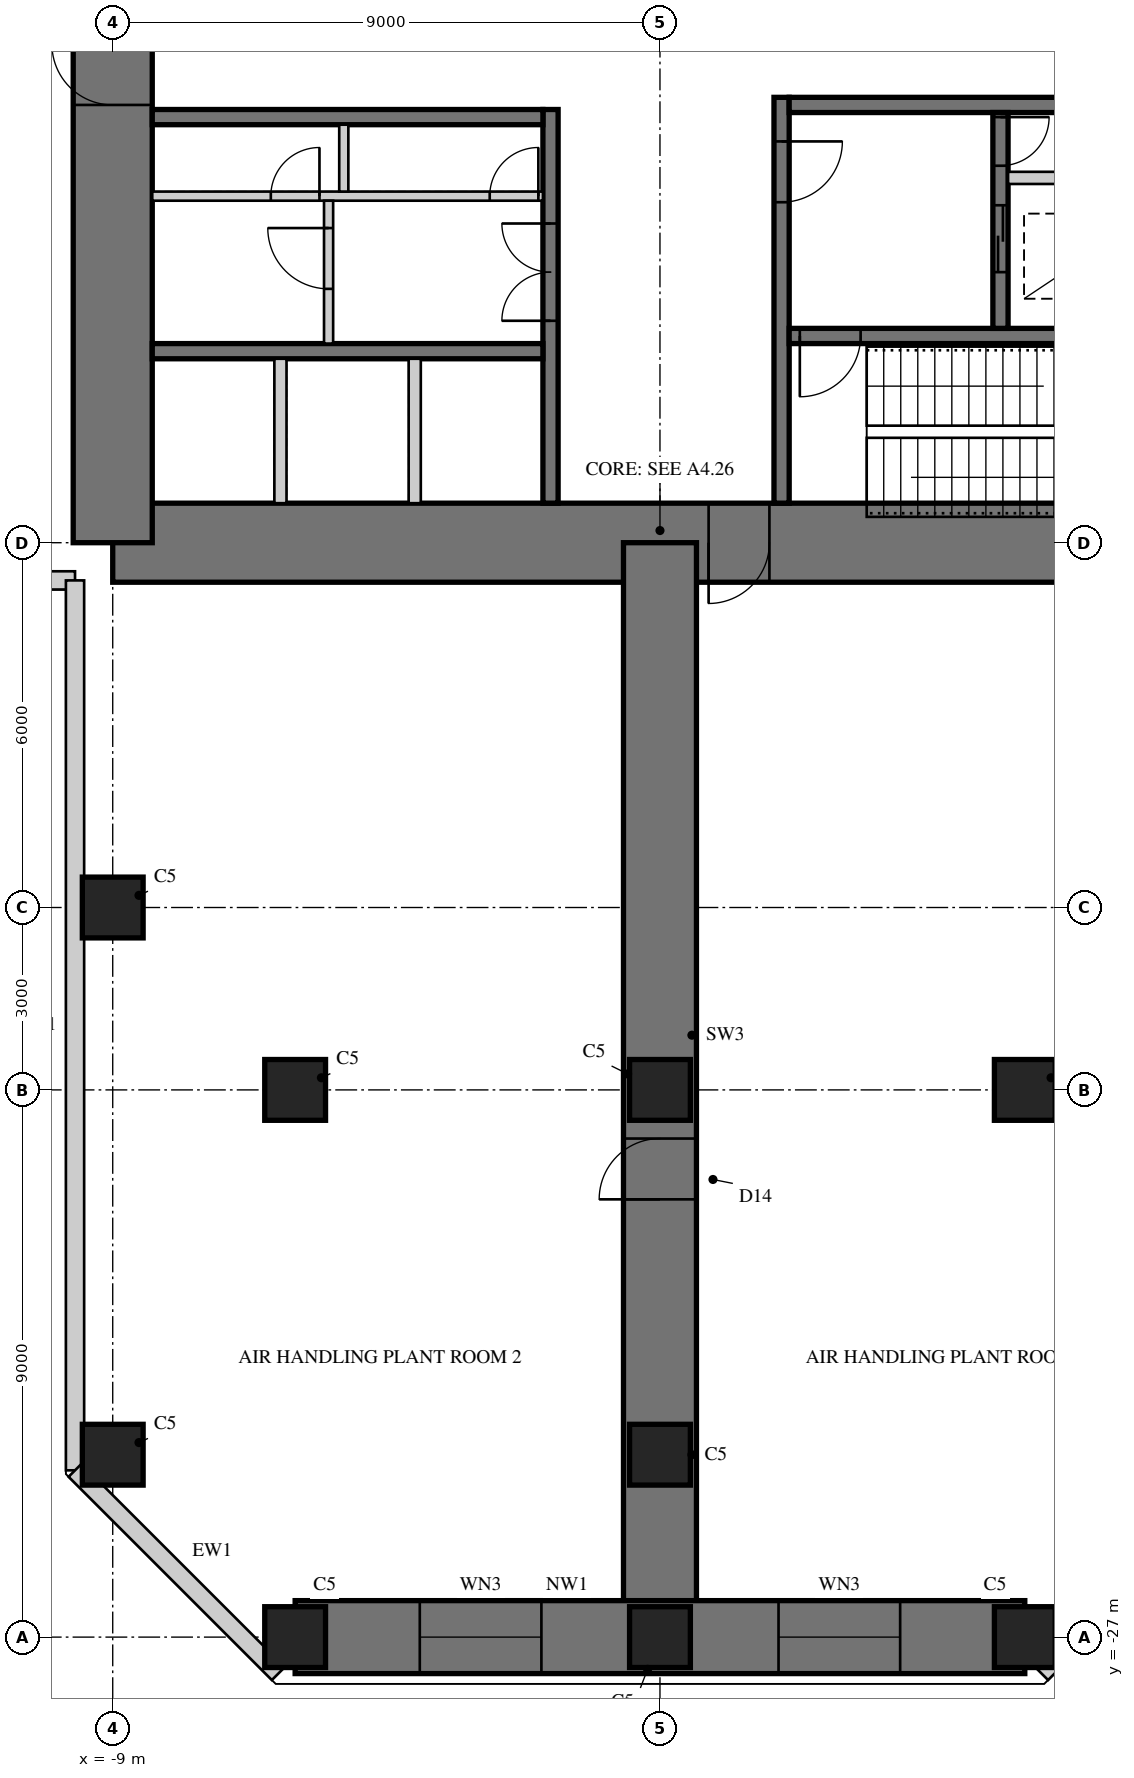
"""IFC4 building model, lengths in metres.
Left out: names, types, materials, properties, quantities, classifications, styles, units other than length and angle.
Written with IfcOpenShell. Run it as: python <this file> out.ifc"""

import sys

from ifc_helpers import new_model, si_unit, direction, frame, frame_2d, origin, origin_2d, place, context, subcontext, project, spatial, rectangle, hollow_rectangle, extrude, element, fill, save


model = new_model("IFC4")
c1 = context("Model", 3, precision=1e-05, world=origin(), true_north=direction((0.0, 1.0)))
c2 = subcontext(c1, "Body", "Model", "MODEL_VIEW")
j1 = project(units=[si_unit("LENGTHUNIT", "METRE"), si_unit("PLANEANGLEUNIT", "RADIAN")], contexts=[c1])
p1 = place(None, origin())
s1 = spatial("IfcSite", under=j1, at=p1, CompositionType="ELEMENT")
p2 = place(p1, origin())
s2 = spatial("IfcBuilding", under=s1, at=p2, CompositionType="ELEMENT")
p3 = place(p2, frame((0.0, 0.0, 164.5)))
s3 = spatial("IfcBuildingStorey", under=s2, at=p3, CompositionType="ELEMENT", Elevation=164.5)
p4 = place(p3, frame((-9.0, -9.0, 0.0), z_axis=(0.0, 0.0, 1.0), x_axis=(1.0, 0.0, 0.0)))
e1 = element("IfcWall", 1, at=p4, inside=s3, PredefinedType="SHEAR", context=c2, shape_type="SweptSolid", body=[
    extrude(rectangle(XDim=18.0, YDim=1.3, at=frame_2d((9.0, 0.0))), origin(), (0.0, 0.0, 1.0), 5.0),
])
p5 = place(p4, frame((9.8, 0.0, 0.0)))
e2 = element("IfcOpeningElement", 2, at=p5, cuts=e1, PredefinedType="OPENING", context=c2, shape_type="SweptSolid", body=[
    extrude(rectangle(XDim=1.0, YDim=2.4, at=frame_2d((0.5, 1.2))), frame((0.0, 0.66, 0.0), z_axis=(0.0, -1.0, 0.0), x_axis=(1.0, 0.0, 0.0)), (0.0, 0.0, 1.0), 1.32),
])
p6 = place(p3, frame((-9.0, 9.0, 0.0), z_axis=(0.0, 0.0, 1.0), x_axis=(0.0, -1.0, 0.0)))
e3 = element("IfcWall", 3, at=p6, inside=s3, PredefinedType="SHEAR", context=c2, shape_type="SweptSolid", body=[
    extrude(rectangle(XDim=18.0, YDim=1.3, at=frame_2d((9.0, 0.0))), origin(), (0.0, 0.0, 1.0), 5.0),
])
p7 = place(p6, frame((9.8, 0.0, 0.0)))
e4 = element("IfcOpeningElement", 4, at=p7, cuts=e3, PredefinedType="OPENING", context=c2, shape_type="SweptSolid", body=[
    extrude(rectangle(XDim=1.0, YDim=2.4, at=frame_2d((0.5, 1.2))), frame((0.0, 0.66, 0.0), z_axis=(0.0, -1.0, 0.0), x_axis=(1.0, 0.0, 0.0)), (0.0, 0.0, 1.0), 1.32),
])
p8 = place(p3, frame((-1.8, -1.875, 0.0), z_axis=(0.0, 0.0, 1.0), x_axis=(0.0, -1.0, 0.0)))
e5 = element("IfcWall", 5, at=p8, inside=s3, PredefinedType="SHEAR", context=c2, shape_type="SweptSolid", body=[
    extrude(rectangle(XDim=6.475, YDim=0.25, at=frame_2d((3.238, 0.0))), origin(), (0.0, 0.0, 1.0), 5.0),
])
p9 = place(p8, frame((1.875, 0.0, 0.0)))
e6 = element("IfcOpeningElement", 6, at=p9, cuts=e5, PredefinedType="OPENING", context=c2, shape_type="SweptSolid", body=[
    extrude(rectangle(XDim=1.6, YDim=2.4, at=frame_2d((0.8, 1.2))), frame((0.0, 0.135, 0.0), z_axis=(0.0, -1.0, 0.0), x_axis=(1.0, 0.0, 0.0)), (0.0, 0.0, 1.0), 0.27),
])
for number, where, z_axis, x_axis in (
    (7, (-1.925, -2.0, 0.0), (0.0, 0.0, 1.0), (-1.0, 0.0, 0.0)),
    (8, (-1.925, -5.85, 0.0), (0.0, 0.0, 1.0), (-1.0, 0.0, 0.0)),
):
    element("IfcWall", number, at=place(p3, frame(where, z_axis=z_axis, x_axis=x_axis)), inside=s3, PredefinedType="SHEAR", context=c2, shape_type="SweptSolid", body=[
        extrude(rectangle(XDim=6.425, YDim=0.25, at=frame_2d((3.212, 0.0))), origin(), (0.0, 0.0, 1.0), 5.0),
    ])
p10 = place(p3, frame((-1.925, -3.3, 0.0), z_axis=(0.0, 0.0, 1.0), x_axis=(-1.0, 0.0, 0.0)))
e9 = element("IfcWall", 9, at=p10, inside=s3, PredefinedType="PARTITIONING", context=c2, shape_type="SweptSolid", body=[
    extrude(rectangle(XDim=6.425, YDim=0.15, at=frame_2d((3.212, 0.0))), origin(), (0.0, 0.0, 1.0), 5.0),
])
p11 = place(p10, frame((0.075, 0.0, 0.0)))
e10 = element("IfcOpeningElement", 10, at=p11, cuts=e9, PredefinedType="OPENING", context=c2, shape_type="SweptSolid", body=[
    extrude(rectangle(XDim=0.8, YDim=2.1, at=frame_2d((0.4, 1.05))), frame((0.0, 0.085, 0.0), z_axis=(0.0, -1.0, 0.0), x_axis=(1.0, 0.0, 0.0)), (0.0, 0.0, 1.0), 0.17),
])
p12 = place(p10, frame((3.675, 0.0, 0.0)))
e11 = element("IfcOpeningElement", 11, at=p12, cuts=e9, PredefinedType="OPENING", context=c2, shape_type="SweptSolid", body=[
    extrude(rectangle(XDim=0.8, YDim=2.1, at=frame_2d((0.4, 1.05))), frame((0.0, 0.085, 0.0), z_axis=(0.0, -1.0, 0.0), x_axis=(1.0, 0.0, 0.0)), (0.0, 0.0, 1.0), 0.17),
])
p13 = place(p3, frame((-5.2, -2.125, 0.0), z_axis=(0.0, 0.0, 1.0), x_axis=(0.0, -1.0, 0.0)))
e12 = element("IfcWall", 12, at=p13, inside=s3, PredefinedType="PARTITIONING", context=c2, shape_type="SweptSolid", body=[
    extrude(rectangle(XDim=1.1, YDim=0.15, at=frame_2d((0.55, 0.0))), origin(), (0.0, 0.0, 1.0), 5.0),
])
for number, where, z_axis, x_axis in (
    (13, (-4.033, -5.975, 0.0), (0.0, 0.0, 1.0), (0.0, -1.0, 0.0)),
    (14, (-6.242, -5.975, 0.0), (0.0, 0.0, 1.0), (0.0, -1.0, 0.0)),
):
    element("IfcWall", number, at=place(p3, frame(where, z_axis=z_axis, x_axis=x_axis)), inside=s3, PredefinedType="PARTITIONING", context=c2, shape_type="SweptSolid", body=[
        extrude(rectangle(XDim=2.375, YDim=0.2, at=frame_2d((1.188, 0.0))), origin(), (0.0, 0.0, 1.0), 5.0),
    ])
p14 = place(p3, frame((2.0, -1.675, 0.0), z_axis=(0.0, 0.0, 1.0), x_axis=(0.0, -1.0, 0.0)))
e15 = element("IfcWall", 15, at=p14, inside=s3, PredefinedType="SHEAR", context=c2, shape_type="SweptSolid", body=[
    extrude(rectangle(XDim=6.675, YDim=0.25, at=frame_2d((3.337, 0.0))), origin(), (0.0, 0.0, 1.0), 5.0),
])
p15 = place(p14, frame((0.725, 0.0, 0.0)))
e16 = element("IfcOpeningElement", 16, at=p15, cuts=e15, PredefinedType="OPENING", context=c2, shape_type="SweptSolid", body=[
    extrude(rectangle(XDim=1.0, YDim=2.1, at=frame_2d((0.5, 1.05))), frame((0.0, 0.135, 0.0), z_axis=(0.0, -1.0, 0.0), x_axis=(1.0, 0.0, 0.0)), (0.0, 0.0, 1.0), 0.27),
])
p16 = place(p3, frame((2.125, -1.8, 0.0), z_axis=(0.0, 0.0, 1.0), x_axis=(1.0, 0.0, 0.0)))
e17 = element("IfcWall", 17, at=p16, inside=s3, PredefinedType="SHEAR", context=c2, shape_type="SweptSolid", body=[
    extrude(rectangle(XDim=6.225, YDim=0.25, at=frame_2d((3.113, 0.0))), origin(), (0.0, 0.0, 1.0), 5.0),
])
p17 = place(p3, frame((2.125, -5.6, 0.0), z_axis=(0.0, 0.0, 1.0), x_axis=(1.0, 0.0, 0.0)))
e18 = element("IfcWall", 18, at=p17, inside=s3, PredefinedType="SHEAR", context=c2, shape_type="SweptSolid", body=[
    extrude(rectangle(XDim=6.225, YDim=0.25, at=frame_2d((3.113, 0.0))), origin(), (0.0, 0.0, 1.0), 5.0),
])
p18 = place(p17, frame((0.175, 0.0, 0.0)))
e19 = element("IfcOpeningElement", 19, at=p18, cuts=e18, PredefinedType="OPENING", context=c2, shape_type="SweptSolid", body=[
    extrude(rectangle(XDim=1.0, YDim=2.1, at=frame_2d((0.5, 1.05))), frame((0.0, 0.135, 0.0), z_axis=(0.0, -1.0, 0.0), x_axis=(1.0, 0.0, 0.0)), (0.0, 0.0, 1.0), 0.27),
])
p19 = place(p3, frame((5.6, -1.925, 0.0), z_axis=(0.0, 0.0, 1.0), x_axis=(0.0, -1.0, 0.0)))
e20 = element("IfcWall", 20, at=p19, inside=s3, PredefinedType="SHEAR", context=c2, shape_type="SweptSolid", body=[
    extrude(rectangle(XDim=3.55, YDim=0.25, at=frame_2d((1.775, 0.0))), origin(), (0.0, 0.0, 1.0), 5.0),
])
p20 = place(p19, frame((1.525, 0.0, 0.0)))
e21 = element("IfcOpeningElement", 21, at=p20, cuts=e20, PredefinedType="OPENING", context=c2, shape_type="SweptSolid", body=[
    extrude(rectangle(XDim=1.1, YDim=2.2, at=frame_2d((0.55, 1.1))), frame((0.0, 0.135, 0.0), z_axis=(0.0, -1.0, 0.0), x_axis=(1.0, 0.0, 0.0)), (0.0, 0.0, 1.0), 0.27),
])
p21 = place(p19, frame((0.075, 0.0, 0.0)))
e22 = element("IfcOpeningElement", 22, at=p21, cuts=e20, PredefinedType="OPENING", context=c2, shape_type="SweptSolid", body=[
    extrude(rectangle(XDim=0.8, YDim=2.1, at=frame_2d((0.4, 1.05))), frame((0.0, 0.135, 0.0), z_axis=(0.0, -1.0, 0.0), x_axis=(1.0, 0.0, 0.0)), (0.0, 0.0, 1.0), 0.27),
])
p22 = place(p3, frame((5.725, -3.0, 0.0), z_axis=(0.0, 0.0, 1.0), x_axis=(1.0, 0.0, 0.0)))
e23 = element("IfcWall", 23, at=p22, inside=s3, PredefinedType="PARTITIONING", context=c2, shape_type="SweptSolid", body=[
    extrude(rectangle(XDim=2.625, YDim=0.2, at=frame_2d((1.312, 0.0))), origin(), (0.0, 0.0, 1.0), 5.0),
])
p23 = place(p3, frame((0.0, -9.0, 0.0), z_axis=(0.0, 0.0, 1.0), x_axis=(0.0, -1.0, 0.0)))
e24 = element("IfcWall", 24, at=p23, inside=s3, PredefinedType="SHEAR", context=c2, shape_type="SweptSolid", body=[
    extrude(rectangle(XDim=18.0, YDim=1.2, at=frame_2d((9.0, 0.0))), origin(), (0.0, 0.0, 1.0), 5.0),
])
p24 = place(p23, frame((9.8, 0.0, 0.0)))
e25 = element("IfcOpeningElement", 25, at=p24, cuts=e24, PredefinedType="OPENING", context=c2, shape_type="SweptSolid", body=[
    extrude(rectangle(XDim=1.0, YDim=2.2, at=frame_2d((0.5, 1.1))), frame((0.0, 0.61, 0.0), z_axis=(0.0, -1.0, 0.0), x_axis=(1.0, 0.0, 0.0)), (0.0, 0.0, 1.0), 1.22),
])
p25 = place(p3, frame((-6.0, -27.0, 0.0), z_axis=(0.0, 0.0, 1.0), x_axis=(1.0, 0.0, 0.0)))
e26 = element("IfcWall", 26, at=p25, inside=s3, PredefinedType="SHEAR", context=c2, shape_type="SweptSolid", body=[
    extrude(rectangle(XDim=12.0, YDim=1.2, at=frame_2d((6.0, 0.0))), origin(), (0.0, 0.0, 1.0), 5.0),
])
p26 = place(p25, frame((2.05, 0.0, 0.8)))
e27 = element("IfcOpeningElement", 27, at=p26, cuts=e26, PredefinedType="OPENING", context=c2, shape_type="SweptSolid", body=[
    extrude(rectangle(XDim=2.0, YDim=2.5, at=frame_2d((1.0, 1.25))), frame((0.0, 0.61, 0.0), z_axis=(0.0, -1.0, 0.0), x_axis=(1.0, 0.0, 0.0)), (0.0, 0.0, 1.0), 1.22),
])
p27 = place(p25, frame((7.95, 0.0, 0.8)))
e28 = element("IfcOpeningElement", 28, at=p27, cuts=e26, PredefinedType="OPENING", context=c2, shape_type="SweptSolid", body=[
    extrude(rectangle(XDim=2.0, YDim=2.5, at=frame_2d((1.0, 1.25))), frame((0.0, 0.61, 0.0), z_axis=(0.0, -1.0, 0.0), x_axis=(1.0, 0.0, 0.0)), (0.0, 0.0, 1.0), 1.22),
])
for number, where, z_axis, x_axis in (
    (29, (-9.0, -15.0, 0.0), (0.0, 0.0, 1.0), (1.0, 0.0, 0.0)),
    (30, (-9.0, -24.0, 0.0), (0.0, 0.0, 1.0), (1.0, 0.0, 0.0)),
    (31, (-6.0, -27.0, 0.0), (0.0, 0.0, 1.0), (1.0, 0.0, 0.0)),
    (32, (0.0, -27.0, 0.0), (0.0, 0.0, 1.0), (1.0, 0.0, 0.0)),
    (33, (6.0, -27.0, 0.0), (0.0, 0.0, 1.0), (1.0, 0.0, 0.0)),
    (34, (-6.0, -18.0, 0.0), (0.0, 0.0, 1.0), (1.0, 0.0, 0.0)),
    (35, (0.0, -18.0, 0.0), (0.0, 0.0, 1.0), (1.0, 0.0, 0.0)),
    (36, (6.0, -18.0, 0.0), (0.0, 0.0, 1.0), (1.0, 0.0, 0.0)),
    (37, (0.0, -24.0, 0.0), (0.0, 0.0, 1.0), (1.0, 0.0, 0.0)),
):
    element("IfcColumn", number, at=place(p3, frame(where, z_axis=z_axis, x_axis=x_axis)), inside=s3, PredefinedType="COLUMN", context=c2, shape_type="SweptSolid", body=[
        extrude(rectangle(XDim=1.0, YDim=1.0, at=origin_2d()), origin(), (0.0, 0.0, 1.0), 5.0),
    ])
p28 = place(p3, frame((-24.257, -9.62, 0.0), z_axis=(0.0, 0.0, 1.0), x_axis=(1.0, 0.0, 0.0)))
e38 = element("IfcWall", 38, at=p28, inside=s3, PredefinedType="SOLIDWALL", context=c2, shape_type="SweptSolid", body=[
    extrude(rectangle(XDim=14.637, YDim=0.3, at=frame_2d((7.318, 0.0))), origin(), (0.0, 0.0, 1.0), 4.82),
])
p29 = place(p28, frame((3.391, 0.0, 0.8)))
e39 = element("IfcOpeningElement", 39, at=p29, cuts=e38, PredefinedType="OPENING", context=c2, shape_type="SweptSolid", body=[
    extrude(rectangle(XDim=2.0, YDim=2.5, at=frame_2d((1.0, 1.25))), frame((0.0, 0.16, 0.0), z_axis=(0.0, -1.0, 0.0), x_axis=(1.0, 0.0, 0.0)), (0.0, 0.0, 1.0), 0.32),
])
p30 = place(p28, frame((6.318, 0.0, 0.8)))
e40 = element("IfcOpeningElement", 40, at=p30, cuts=e38, PredefinedType="OPENING", context=c2, shape_type="SweptSolid", body=[
    extrude(rectangle(XDim=2.0, YDim=2.5, at=frame_2d((1.0, 1.25))), frame((0.0, 0.16, 0.0), z_axis=(0.0, -1.0, 0.0), x_axis=(1.0, 0.0, 0.0)), (0.0, 0.0, 1.0), 0.32),
])
p31 = place(p28, frame((12.173, 0.0, 0.8)))
e41 = element("IfcOpeningElement", 41, at=p31, cuts=e38, PredefinedType="OPENING", context=c2, shape_type="SweptSolid", body=[
    extrude(rectangle(XDim=2.0, YDim=2.5, at=frame_2d((1.0, 1.25))), frame((0.0, 0.16, 0.0), z_axis=(0.0, -1.0, 0.0), x_axis=(1.0, 0.0, 0.0)), (0.0, 0.0, 1.0), 0.32),
])
p32 = place(p3, frame((-9.62, -9.62, 0.0), z_axis=(0.0, 0.0, 1.0), x_axis=(0.0, -1.0, 0.0)))
e42 = element("IfcWall", 42, at=p32, inside=s3, PredefinedType="SOLIDWALL", context=c2, shape_type="SweptSolid", body=[
    extrude(rectangle(XDim=14.637, YDim=0.3, at=frame_2d((7.318, 0.0))), origin(), (0.0, 0.0, 1.0), 4.82),
])
for number, where, z_axis, x_axis in (
    (43, (-9.62, -24.257, 0.0), (0.0, 0.0, 1.0), (0.707, -0.707, 0.0)),
    (44, (6.277, -27.6, 0.0), (0.0, 0.0, 1.0), (0.707, 0.707, 0.0)),
):
    element("IfcWall", number, at=place(p3, frame(where, z_axis=z_axis, x_axis=x_axis)), inside=s3, PredefinedType="SOLIDWALL", context=c2, shape_type="SweptSolid", body=[
        extrude(rectangle(XDim=4.728, YDim=0.3, at=frame_2d((2.364, 0.0))), origin(), (0.0, 0.0, 1.0), 4.82),
    ])
p33 = place(p3, frame((-5.45, -3.375, 0.0), z_axis=(0.0, 0.0, 1.0), x_axis=(0.0, -1.0, 0.0)))
e45 = element("IfcWall", 45, at=p33, inside=s3, PredefinedType="PARTITIONING", context=c2, shape_type="SweptSolid", body=[
    extrude(rectangle(XDim=2.35, YDim=0.15, at=frame_2d((1.175, 0.0))), origin(), (0.0, 0.0, 1.0), 4.82),
])
p34 = place(p33, frame((0.45, 0.0, 0.0)))
e46 = element("IfcOpeningElement", 46, at=p34, cuts=e45, PredefinedType="OPENING", context=c2, shape_type="SweptSolid", body=[
    extrude(rectangle(XDim=1.0, YDim=2.1, at=frame_2d((0.5, 1.05))), frame((0.0, 0.085, 0.0), z_axis=(0.0, -1.0, 0.0), x_axis=(1.0, 0.0, 0.0)), (0.0, 0.0, 1.0), 0.17),
])
p35 = place(p26, origin())
e47 = element("IfcWindow", 47, at=p35, inside=s3, PartitioningType="SINGLE_PANEL", PredefinedType="WINDOW", context=c2, shape_type="SweptSolid", body=[
    extrude(hollow_rectangle(XDim=2.0, YDim=2.5, WallThickness=0.06, at=frame_2d((1.0, 1.25))), frame((0.0, 0.03, 0.0), z_axis=(0.0, -1.0, 0.0), x_axis=(1.0, 0.0, 0.0)), (0.0, 0.0, 1.0), 0.06),
    extrude(rectangle(XDim=1.879, YDim=2.379, at=frame_2d((1.0, 1.25))), frame((0.0, 0.03, 0.0), z_axis=(0.0, -1.0, 0.0), x_axis=(1.0, 0.0, 0.0)), (0.0, 0.0, 1.0), 0.06),
])
fill(e27, e47)
p36 = place(p27, origin())
e48 = element("IfcWindow", 48, at=p36, inside=s3, PartitioningType="SINGLE_PANEL", PredefinedType="WINDOW", context=c2, shape_type="SweptSolid", body=[
    extrude(hollow_rectangle(XDim=2.0, YDim=2.5, WallThickness=0.06, at=frame_2d((1.0, 1.25))), frame((0.0, 0.03, 0.0), z_axis=(0.0, -1.0, 0.0), x_axis=(1.0, 0.0, 0.0)), (0.0, 0.0, 1.0), 0.06),
    extrude(rectangle(XDim=1.879, YDim=2.379, at=frame_2d((1.0, 1.25))), frame((0.0, 0.03, 0.0), z_axis=(0.0, -1.0, 0.0), x_axis=(1.0, 0.0, 0.0)), (0.0, 0.0, 1.0), 0.06),
])
fill(e28, e48)
p37 = place(p34, frame((1.0, 0.0, 0.0), z_axis=(0.0, 0.0, 1.0), x_axis=(-1.0, 0.0, 0.0)))
e49 = element("IfcDoor", 49, at=p37, inside=s3, OperationType="SINGLE_SWING_RIGHT", PredefinedType="DOOR", context=c2, shape_type="SweptSolid", body=[
    extrude(rectangle(XDim=1.0, YDim=2.1, at=frame_2d((0.5, 1.05))), frame((0.0, 0.025, 0.0), z_axis=(0.0, -1.0, 0.0), x_axis=(1.0, 0.0, 0.0)), (0.0, 0.0, 1.0), 0.05),
])
fill(e46, e49)
p38 = place(p24, frame((1.0, 0.0, 0.0), z_axis=(0.0, 0.0, 1.0), x_axis=(-1.0, 0.0, 0.0)))
e50 = element("IfcDoor", 50, at=p38, inside=s3, OperationType="SINGLE_SWING_LEFT", PredefinedType="DOOR", context=c2, shape_type="SweptSolid", body=[
    extrude(rectangle(XDim=1.0, YDim=2.2, at=frame_2d((0.5, 1.1))), frame((0.0, 0.025, 0.0), z_axis=(0.0, -1.0, 0.0), x_axis=(1.0, 0.0, 0.0)), (0.0, 0.0, 1.0), 0.05),
])
fill(e25, e50)
p39 = place(p5, frame((1.0, 0.0, 0.0), z_axis=(0.0, 0.0, 1.0), x_axis=(-1.0, 0.0, 0.0)))
e51 = element("IfcDoor", 51, at=p39, inside=s3, OperationType="SINGLE_SWING_RIGHT", PredefinedType="DOOR", context=c2, shape_type="SweptSolid", body=[
    extrude(rectangle(XDim=1.0, YDim=2.4, at=frame_2d((0.5, 1.2))), frame((0.0, -0.005, 0.0), z_axis=(0.0, -1.0, 0.0), x_axis=(1.0, 0.0, 0.0)), (0.0, 0.0, 1.0), 0.05),
])
fill(e2, e51)
p40 = place(p7, frame((1.0, 0.0, 0.0), z_axis=(0.0, 0.0, 1.0), x_axis=(-1.0, 0.0, 0.0)))
e52 = element("IfcDoor", 52, at=p40, inside=s3, OperationType="SINGLE_SWING_RIGHT", PredefinedType="DOOR", context=c2, shape_type="SweptSolid", body=[
    extrude(rectangle(XDim=1.0, YDim=2.4, at=frame_2d((0.5, 1.2))), frame((0.0, -0.005, 0.0), z_axis=(0.0, -1.0, 0.0), x_axis=(1.0, 0.0, 0.0)), (0.0, 0.0, 1.0), 0.05),
])
fill(e4, e52)
p41 = place(p9, frame((1.6, 0.0, 0.0), z_axis=(0.0, 0.0, 1.0), x_axis=(-1.0, 0.0, 0.0)))
e53 = element("IfcDoor", 53, at=p41, inside=s3, OperationType="DOUBLE_DOOR_SINGLE_SWING", PredefinedType="DOOR", context=c2, shape_type="SweptSolid", body=[
    extrude(rectangle(XDim=1.6, YDim=2.4, at=frame_2d((0.8, 1.2))), frame((0.0, 0.025, 0.0), z_axis=(0.0, -1.0, 0.0), x_axis=(1.0, 0.0, 0.0)), (0.0, 0.0, 1.0), 0.05),
])
fill(e6, e53)
p42 = place(p11, frame((0.8, 0.0, 0.0), z_axis=(0.0, 0.0, 1.0), x_axis=(-1.0, 0.0, 0.0)))
e54 = element("IfcDoor", 54, at=p42, inside=s3, OperationType="SINGLE_SWING_RIGHT", PredefinedType="DOOR", context=c2, shape_type="SweptSolid", body=[
    extrude(rectangle(XDim=0.8, YDim=2.1, at=frame_2d((0.4, 1.05))), frame((0.0, 0.025, 0.0), z_axis=(0.0, -1.0, 0.0), x_axis=(1.0, 0.0, 0.0)), (0.0, 0.0, 1.0), 0.05),
])
fill(e10, e54)
p43 = place(p12, frame((0.8, 0.0, 0.0), z_axis=(0.0, 0.0, 1.0), x_axis=(-1.0, 0.0, 0.0)))
e55 = element("IfcDoor", 55, at=p43, inside=s3, OperationType="SINGLE_SWING_RIGHT", PredefinedType="DOOR", context=c2, shape_type="SweptSolid", body=[
    extrude(rectangle(XDim=0.8, YDim=2.1, at=frame_2d((0.4, 1.05))), frame((0.0, 0.025, 0.0), z_axis=(0.0, -1.0, 0.0), x_axis=(1.0, 0.0, 0.0)), (0.0, 0.0, 1.0), 0.05),
])
fill(e11, e55)
p44 = place(p15, origin())
e56 = element("IfcDoor", 56, at=p44, inside=s3, OperationType="SINGLE_SWING_LEFT", PredefinedType="DOOR", context=c2, shape_type="SweptSolid", body=[
    extrude(rectangle(XDim=1.0, YDim=2.1, at=frame_2d((0.5, 1.05))), frame((0.0, 0.025, 0.0), z_axis=(0.0, -1.0, 0.0), x_axis=(1.0, 0.0, 0.0)), (0.0, 0.0, 1.0), 0.05),
])
fill(e16, e56)
p45 = place(p18, frame((1.0, 0.0, 0.0), z_axis=(0.0, 0.0, 1.0), x_axis=(-1.0, 0.0, 0.0)))
e57 = element("IfcDoor", 57, at=p45, inside=s3, OperationType="SINGLE_SWING_RIGHT", PredefinedType="DOOR", context=c2, shape_type="SweptSolid", body=[
    extrude(rectangle(XDim=1.0, YDim=2.1, at=frame_2d((0.5, 1.05))), frame((0.0, 0.025, 0.0), z_axis=(0.0, -1.0, 0.0), x_axis=(1.0, 0.0, 0.0)), (0.0, 0.0, 1.0), 0.05),
])
fill(e19, e57)
p46 = place(p20, origin())
e58 = element("IfcDoor", 58, at=p46, inside=s3, OperationType="DOUBLE_DOOR_SLIDING", PredefinedType="DOOR", context=c2, shape_type="SweptSolid", body=[
    extrude(rectangle(XDim=1.1, YDim=2.2, at=frame_2d((0.55, 1.1))), frame((0.0, 0.025, 0.0), z_axis=(0.0, -1.0, 0.0), x_axis=(1.0, 0.0, 0.0)), (0.0, 0.0, 1.0), 0.05),
])
fill(e21, e58)
p47 = place(p21, origin())
e59 = element("IfcDoor", 59, at=p47, inside=s3, OperationType="SINGLE_SWING_LEFT", PredefinedType="DOOR", context=c2, shape_type="SweptSolid", body=[
    extrude(rectangle(XDim=0.8, YDim=2.1, at=frame_2d((0.4, 1.05))), frame((0.0, 0.025, 0.0), z_axis=(0.0, -1.0, 0.0), x_axis=(1.0, 0.0, 0.0)), (0.0, 0.0, 1.0), 0.05),
])
fill(e22, e59)
save(model, sys.argv[1])
